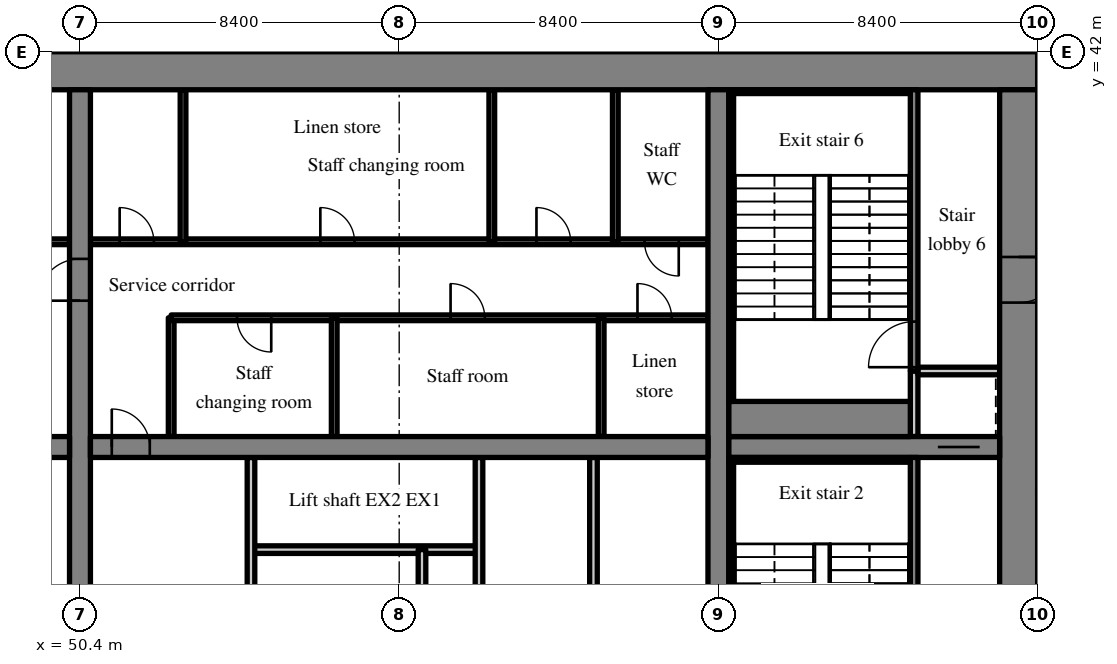
"""IFC4 building model, lengths in metres.
Left out: names, types, materials, properties, quantities, classifications, styles, units other than length and angle.
Written with IfcOpenShell. Run it as: python <this file> out.ifc"""

import sys

from ifc_helpers import new_model, si_unit, direction, frame, frame_2d, origin, place, context, subcontext, project, spatial, rectangle, extrude, source, transform, mapped, element, fill, save


model = new_model("IFC4")
c1 = context("Model", 3, precision=1e-05, world=origin(), true_north=direction((0.0, 1.0)))
c2 = subcontext(c1, "Body", "Model", "MODEL_VIEW")
j1 = project(units=[si_unit("LENGTHUNIT", "METRE"), si_unit("PLANEANGLEUNIT", "RADIAN")], contexts=[c1])
p1 = place(None, origin())
s1 = spatial("IfcSite", under=j1, at=p1, CompositionType="ELEMENT")
p2 = place(p1, origin())
s2 = spatial("IfcBuilding", under=s1, at=p2, CompositionType="ELEMENT")
p3 = place(p2, frame((0.0, 0.0, 58.2)))
s3 = spatial("IfcBuildingStorey", under=s2, at=p3, CompositionType="ELEMENT", Elevation=58.2)
m1 = source(origin(), c2, "Body", "SweptSolid", [
    extrude(rectangle(XDim=50.4, YDim=1.0, at=frame_2d((25.2, 0.0))), origin(), (0.0, 0.0, 1.0), 3.52),
])
p4 = place(p3, frame((25.2, 41.5, 0.0), z_axis=(0.0, 0.0, 1.0), x_axis=(1.0, 0.0, 0.0)))
e1 = element("IfcWall", 1, at=p4, inside=s3, PredefinedType="SHEAR", context=c2, shape_type="MappedRepresentation", body=[
    mapped(m1, transform((0.0, 0.0, 0.0), scale=1.0)),
])
m2 = source(origin(), c2, "Body", "SweptSolid", [
    extrude(rectangle(XDim=18.0, YDim=1.0, at=frame_2d((9.0, 0.0))), origin(), (0.0, 0.0, 1.0), 3.52),
])
p5 = place(p3, frame((75.1, 23.0, 0.0), z_axis=(0.0, 0.0, 1.0), x_axis=(0.0, 1.0, 0.0)))
e2 = element("IfcWall", 2, at=p5, inside=s3, PredefinedType="SHEAR", context=c2, shape_type="MappedRepresentation", body=[
    mapped(m2, transform((0.0, 0.0, 0.0), scale=1.0)),
])
m3 = source(origin(), c2, "Body", "SweptSolid", [
    extrude(rectangle(XDim=1.0, YDim=2.1, at=frame_2d((0.5, 1.05))), frame((0.0, 0.51, 0.0), z_axis=(0.0, -1.0, 0.0), x_axis=(1.0, 0.0, 0.0)), (0.0, 0.0, 1.0), 1.02),
])
p6 = place(p5, frame((2.5, 0.0, 0.0)))
e3 = element("IfcOpeningElement", 3, at=p6, cuts=e2, PredefinedType="OPENING", context=c2, shape_type="MappedRepresentation", body=[
    mapped(m3, transform((0.0, 0.0, 0.0), scale=1.0)),
])
m4 = source(origin(), c2, "Body", "SweptSolid", [
    extrude(rectangle(XDim=1.2, YDim=2.1, at=frame_2d((0.6, 1.05))), frame((0.0, 0.51, 0.0), z_axis=(0.0, -1.0, 0.0), x_axis=(1.0, 0.0, 0.0)), (0.0, 0.0, 1.0), 1.02),
])
p7 = place(p5, frame((12.4, 0.0, 0.0)))
e4 = element("IfcOpeningElement", 4, at=p7, cuts=e2, PredefinedType="OPENING", context=c2, shape_type="MappedRepresentation", body=[
    mapped(m4, transform((0.0, 0.0, 0.0), scale=1.0)),
])
m5 = source(origin(), c2, "Body", "SweptSolid", [
    extrude(rectangle(XDim=18.0, YDim=0.55, at=frame_2d((9.0, 0.0))), origin(), (0.0, 0.0, 1.0), 3.52),
])
p8 = place(p3, frame((50.4, 23.0, 0.0), z_axis=(0.0, 0.0, 1.0), x_axis=(0.0, 1.0, 0.0)))
e5 = element("IfcWall", 5, at=p8, inside=s3, PredefinedType="SHEAR", context=c2, shape_type="MappedRepresentation", body=[
    mapped(m5, transform((0.0, 0.0, 0.0), scale=1.0)),
])
m6 = source(origin(), c2, "Body", "SweptSolid", [
    extrude(rectangle(XDim=1.1, YDim=2.1, at=frame_2d((0.55, 1.05))), frame((0.0, 0.285, 0.0), z_axis=(0.0, -1.0, 0.0), x_axis=(1.0, 0.0, 0.0)), (0.0, 0.0, 1.0), 0.57),
])
p9 = place(p8, frame((12.45, 0.0, 0.0)))
e6 = element("IfcOpeningElement", 6, at=p9, cuts=e5, PredefinedType="OPENING", context=c2, shape_type="MappedRepresentation", body=[
    mapped(m6, transform((0.0, 0.0, 0.0), scale=1.0)),
])
p10 = place(p3, frame((67.2, 23.0, 0.0), z_axis=(0.0, 0.0, 1.0), x_axis=(0.0, 1.0, 0.0)))
e7 = element("IfcWall", 7, at=p10, inside=s3, PredefinedType="SHEAR", context=c2, shape_type="MappedRepresentation", body=[
    mapped(m5, transform((0.0, 0.0, 0.0), scale=1.0)),
])
m7 = source(origin(), c2, "Body", "SweptSolid", [
    extrude(rectangle(XDim=16.25, YDim=0.55, at=frame_2d((8.125, 0.0))), origin(), (0.0, 0.0, 1.0), 3.52),
])
p11 = place(p3, frame((33.875, 31.6, 0.0), z_axis=(0.0, 0.0, 1.0), x_axis=(1.0, 0.0, 0.0)))
e8 = element("IfcWall", 8, at=p11, inside=s3, PredefinedType="SHEAR", context=c2, shape_type="MappedRepresentation", body=[
    mapped(m7, transform((0.0, 0.0, 0.0), scale=1.0)),
])
m8 = source(origin(), c2, "Body", "SweptSolid", [
    extrude(rectangle(XDim=1.0, YDim=2.1, at=frame_2d((0.5, 1.05))), frame((0.0, 0.285, 0.0), z_axis=(0.0, -1.0, 0.0), x_axis=(1.0, 0.0, 0.0)), (0.0, 0.0, 1.0), 0.57),
])
p12 = place(p11, frame((14.687, 0.0, 0.0)))
e9 = element("IfcOpeningElement", 9, at=p12, cuts=e8, PredefinedType="OPENING", context=c2, shape_type="MappedRepresentation", body=[
    mapped(m8, transform((0.0, 0.0, 0.0), scale=1.0)),
])
p13 = place(p3, frame((50.675, 31.6, 0.0), z_axis=(0.0, 0.0, 1.0), x_axis=(1.0, 0.0, 0.0)))
e10 = element("IfcWall", 10, at=p13, inside=s3, PredefinedType="SHEAR", context=c2, shape_type="MappedRepresentation", body=[
    mapped(m7, transform((0.0, 0.0, 0.0), scale=1.0)),
])
p14 = place(p13, frame((0.562, 0.0, 0.0)))
e11 = element("IfcOpeningElement", 11, at=p14, cuts=e10, PredefinedType="OPENING", context=c2, shape_type="MappedRepresentation", body=[
    mapped(m8, transform((0.0, 0.0, 0.0), scale=1.0)),
])
m9 = source(origin(), c2, "Body", "SweptSolid", [
    extrude(rectangle(XDim=7.125, YDim=0.55, at=frame_2d((3.562, 0.0))), origin(), (0.0, 0.0, 1.0), 3.52),
])
p15 = place(p3, frame((67.475, 31.6, 0.0), z_axis=(0.0, 0.0, 1.0), x_axis=(1.0, 0.0, 0.0)))
e12 = element("IfcWall", 12, at=p15, inside=s3, PredefinedType="SHEAR", context=c2, shape_type="MappedRepresentation", body=[
    mapped(m9, transform((0.0, 0.0, 0.0), scale=1.0)),
])
p16 = place(p15, frame((5.5, 0.0, 0.0)))
e13 = element("IfcOpeningElement", 13, at=p16, cuts=e12, PredefinedType="OPENING", context=c2, shape_type="MappedRepresentation", body=[
    mapped(m6, transform((0.0, 0.0, 0.0), scale=1.0)),
])
m10 = source(origin(), c2, "Body", "SweptSolid", [
    extrude(rectangle(XDim=16.25, YDim=0.15, at=frame_2d((8.125, 0.0))), origin(), (0.0, 0.0, 1.0), 3.52),
])
p17 = place(p3, frame((33.875, 37.0, 0.0), z_axis=(0.0, 0.0, 1.0), x_axis=(1.0, 0.0, 0.0)))
e14 = element("IfcWall", 14, at=p17, inside=s3, PredefinedType="PARTITIONING", context=c2, shape_type="MappedRepresentation", body=[
    mapped(m10, transform((0.0, 0.0, 0.0), scale=1.0)),
])
m11 = source(origin(), c2, "Body", "SweptSolid", [
    extrude(rectangle(XDim=0.9, YDim=2.1, at=frame_2d((0.45, 1.05))), frame((0.0, 0.085, 0.0), z_axis=(0.0, -1.0, 0.0), x_axis=(1.0, 0.0, 0.0)), (0.0, 0.0, 1.0), 0.17),
])
p18 = place(p17, frame((3.206, 0.0, 0.0)))
e15 = element("IfcOpeningElement", 15, at=p18, cuts=e14, PredefinedType="OPENING", context=c2, shape_type="MappedRepresentation", body=[
    mapped(m11, transform((0.0, 0.0, 0.0), scale=1.0)),
])
p19 = place(p17, frame((8.081, 0.0, 0.0)))
e16 = element("IfcOpeningElement", 16, at=p19, cuts=e14, PredefinedType="OPENING", context=c2, shape_type="MappedRepresentation", body=[
    mapped(m11, transform((0.0, 0.0, 0.0), scale=1.0)),
])
p20 = place(p17, frame((11.331, 0.0, 0.0)))
e17 = element("IfcOpeningElement", 17, at=p20, cuts=e14, PredefinedType="OPENING", context=c2, shape_type="MappedRepresentation", body=[
    mapped(m11, transform((0.0, 0.0, 0.0), scale=1.0)),
])
p21 = place(p17, frame((14.581, 0.0, 0.0)))
e18 = element("IfcOpeningElement", 18, at=p21, cuts=e14, PredefinedType="OPENING", context=c2, shape_type="MappedRepresentation", body=[
    mapped(m11, transform((0.0, 0.0, 0.0), scale=1.0)),
])
m12 = source(origin(), c2, "Body", "SweptSolid", [
    extrude(rectangle(XDim=6.0, YDim=0.2, at=frame_2d((3.0, 0.0))), origin(), (0.0, 0.0, 1.0), 3.52),
])
p22 = place(p3, frame((60.9, 28.9, 0.0), z_axis=(0.0, 0.0, 1.0), x_axis=(-1.0, 0.0, 0.0)))
e19 = element("IfcWall", 19, at=p22, inside=s3, PredefinedType="SOLIDWALL", context=c2, shape_type="MappedRepresentation", body=[
    mapped(m12, transform((0.0, 0.0, 0.0), scale=1.0)),
])
m13 = source(origin(), c2, "Body", "SweptSolid", [
    extrude(rectangle(XDim=8.325, YDim=0.2, at=frame_2d((4.163, 0.0))), origin(), (0.0, 0.0, 1.0), 3.52),
])
for number, where, z_axis, x_axis in (
    (20, (54.9, 23.0, 0.0), (0.0, 0.0, 1.0), (0.0, 1.0, 0.0)),
    (21, (60.9, 23.0, 0.0), (0.0, 0.0, 1.0), (0.0, 1.0, 0.0)),
):
    element("IfcWall", number, at=place(p3, frame(where, z_axis=z_axis, x_axis=x_axis)), inside=s3, PredefinedType="PARTITIONING", context=c2, shape_type="MappedRepresentation", body=[
        mapped(m13, transform((0.0, 0.0, 0.0), scale=1.0)),
    ])
m14 = source(origin(), c2, "Body", "SweptSolid", [
    extrude(rectangle(XDim=5.9, YDim=0.2, at=frame_2d((2.95, 0.0))), origin(), (0.0, 0.0, 1.0), 3.52),
])
p23 = place(p3, frame((59.4, 23.0, 0.0), z_axis=(0.0, 0.0, 1.0), x_axis=(0.0, 1.0, 0.0)))
e22 = element("IfcWall", 22, at=p23, inside=s3, PredefinedType="PARTITIONING", context=c2, shape_type="MappedRepresentation", body=[
    mapped(m14, transform((0.0, 0.0, 0.0), scale=1.0)),
])
p24 = place(p3, frame((63.912, 23.0, 0.0), z_axis=(0.0, 0.0, 1.0), x_axis=(0.0, 1.0, 0.0)))
e23 = element("IfcWall", 23, at=p24, inside=s3, PredefinedType="PARTITIONING", context=c2, shape_type="MappedRepresentation", body=[
    mapped(m13, transform((0.0, 0.0, 0.0), scale=1.0)),
])
m15 = source(origin(), c2, "Body", "SweptSolid", [
    extrude(rectangle(XDim=3.125, YDim=0.15, at=frame_2d((1.562, 0.0))), origin(), (0.0, 0.0, 1.0), 3.52),
])
p25 = place(p3, frame((52.8, 31.875, 0.0), z_axis=(0.0, 0.0, 1.0), x_axis=(0.0, 1.0, 0.0)))
e24 = element("IfcWall", 24, at=p25, inside=s3, PredefinedType="PARTITIONING", context=c2, shape_type="MappedRepresentation", body=[
    mapped(m15, transform((0.0, 0.0, 0.0), scale=1.0)),
])
m16 = source(origin(), c2, "Body", "SweptSolid", [
    extrude(rectangle(XDim=14.125, YDim=0.15, at=frame_2d((7.062, 0.0))), origin(), (0.0, 0.0, 1.0), 3.52),
])
p26 = place(p3, frame((66.925, 35.0, 0.0), z_axis=(0.0, 0.0, 1.0), x_axis=(-1.0, 0.0, 0.0)))
e25 = element("IfcWall", 25, at=p26, inside=s3, PredefinedType="PARTITIONING", context=c2, shape_type="MappedRepresentation", body=[
    mapped(m16, transform((0.0, 0.0, 0.0), scale=1.0)),
])
p27 = place(p26, frame((0.955, 0.0, 0.0)))
e26 = element("IfcOpeningElement", 26, at=p27, cuts=e25, PredefinedType="OPENING", context=c2, shape_type="MappedRepresentation", body=[
    mapped(m11, transform((0.0, 0.0, 0.0), scale=1.0)),
])
p28 = place(p26, frame((5.873, 0.0, 0.0)))
e27 = element("IfcOpeningElement", 27, at=p28, cuts=e25, PredefinedType="OPENING", context=c2, shape_type="MappedRepresentation", body=[
    mapped(m11, transform((0.0, 0.0, 0.0), scale=1.0)),
])
p29 = place(p26, frame((11.492, 0.0, 0.0)))
e28 = element("IfcOpeningElement", 28, at=p29, cuts=e25, PredefinedType="OPENING", context=c2, shape_type="MappedRepresentation", body=[
    mapped(m11, transform((0.0, 0.0, 0.0), scale=1.0)),
])
p30 = place(p3, frame((66.925, 37.0, 0.0), z_axis=(0.0, 0.0, 1.0), x_axis=(-1.0, 0.0, 0.0)))
e29 = element("IfcWall", 29, at=p30, inside=s3, PredefinedType="PARTITIONING", context=c2, shape_type="MappedRepresentation", body=[
    mapped(m10, transform((0.0, 0.0, 0.0), scale=1.0)),
])
p31 = place(p30, frame((0.769, 0.0, 0.0)))
e30 = element("IfcOpeningElement", 30, at=p31, cuts=e29, PredefinedType="OPENING", context=c2, shape_type="MappedRepresentation", body=[
    mapped(m11, transform((0.0, 0.0, 0.0), scale=1.0)),
])
p32 = place(p30, frame((3.613, 0.0, 0.0)))
e31 = element("IfcOpeningElement", 31, at=p32, cuts=e29, PredefinedType="OPENING", context=c2, shape_type="MappedRepresentation", body=[
    mapped(m11, transform((0.0, 0.0, 0.0), scale=1.0)),
])
p33 = place(p30, frame((9.3, 0.0, 0.0)))
e32 = element("IfcOpeningElement", 32, at=p33, cuts=e29, PredefinedType="OPENING", context=c2, shape_type="MappedRepresentation", body=[
    mapped(m11, transform((0.0, 0.0, 0.0), scale=1.0)),
])
p34 = place(p30, frame((14.581, 0.0, 0.0)))
e33 = element("IfcOpeningElement", 33, at=p34, cuts=e29, PredefinedType="OPENING", context=c2, shape_type="MappedRepresentation", body=[
    mapped(m11, transform((0.0, 0.0, 0.0), scale=1.0)),
])
for number, where, z_axis, x_axis in (
    (34, (64.115, 31.875, 0.0), (0.0, 0.0, 1.0), (0.0, 1.0, 0.0)),
    (35, (57.09, 31.875, 0.0), (0.0, 0.0, 1.0), (0.0, 1.0, 0.0)),
):
    element("IfcWall", number, at=place(p3, frame(where, z_axis=z_axis, x_axis=x_axis)), inside=s3, PredefinedType="PARTITIONING", context=c2, shape_type="MappedRepresentation", body=[
        mapped(m15, transform((0.0, 0.0, 0.0), scale=1.0)),
    ])
m17 = source(origin(), c2, "Body", "SweptSolid", [
    extrude(rectangle(XDim=4.0, YDim=0.15, at=frame_2d((2.0, 0.0))), origin(), (0.0, 0.0, 1.0), 3.52),
])
for number, where, z_axis, x_axis in (
    (36, (64.487, 37.0, 0.0), (0.0, 0.0, 1.0), (0.0, 1.0, 0.0)),
    (37, (61.237, 37.0, 0.0), (0.0, 0.0, 1.0), (0.0, 1.0, 0.0)),
    (38, (53.112, 37.0, 0.0), (0.0, 0.0, 1.0), (0.0, 1.0, 0.0)),
):
    element("IfcWall", number, at=place(p3, frame(where, z_axis=z_axis, x_axis=x_axis)), inside=s3, PredefinedType="PARTITIONING", context=c2, shape_type="MappedRepresentation", body=[
        mapped(m17, transform((0.0, 0.0, 0.0), scale=1.0)),
    ])
m18 = source(origin(), c2, "Body", "SweptSolid", [
    extrude(rectangle(XDim=8.325, YDim=0.2, at=frame_2d((4.163, 0.0))), origin(), (0.0, 0.0, 1.0), 3.52),
])
p35 = place(p3, frame((72.35, 23.0, 0.0), z_axis=(0.0, 0.0, 1.0), x_axis=(0.0, 1.0, 0.0)))
e39 = element("IfcWall", 39, at=p35, inside=s3, PredefinedType="SOLIDWALL", context=c2, shape_type="MappedRepresentation", body=[
    mapped(m18, transform((0.0, 0.0, 0.0), scale=1.0)),
])
m19 = source(origin(), c2, "Body", "SweptSolid", [
    extrude(rectangle(XDim=1.2, YDim=2.1, at=frame_2d((0.6, 1.05))), frame((0.0, 0.11, 0.0), z_axis=(0.0, -1.0, 0.0), x_axis=(1.0, 0.0, 0.0)), (0.0, 0.0, 1.0), 0.22),
])
p36 = place(p35, frame((0.6, 0.0, 0.0)))
e40 = element("IfcOpeningElement", 40, at=p36, cuts=e39, PredefinedType="OPENING", context=c2, shape_type="MappedRepresentation", body=[
    mapped(m19, transform((0.0, 0.0, 0.0), scale=1.0)),
])
m20 = source(origin(), c2, "Body", "SweptSolid", [
    extrude(rectangle(XDim=1.725, YDim=0.2, at=frame_2d((0.863, 0.0))), origin(), (0.0, 0.0, 1.0), 3.52),
])
p37 = place(p3, frame((72.35, 31.875, 0.0), z_axis=(0.0, 0.0, 1.0), x_axis=(0.0, 1.0, 0.0)))
e41 = element("IfcWall", 41, at=p37, inside=s3, PredefinedType="SOLIDWALL", context=c2, shape_type="MappedRepresentation", body=[
    mapped(m20, transform((0.0, 0.0, 0.0), scale=1.0)),
])
m21 = source(origin(), c2, "Body", "SweptSolid", [
    extrude(rectangle(XDim=2.15, YDim=0.2, at=frame_2d((1.075, 0.0))), origin(), (0.0, 0.0, 1.0), 3.52),
])
p38 = place(p3, frame((72.45, 33.6, 0.0), z_axis=(0.0, 0.0, 1.0), x_axis=(1.0, 0.0, 0.0)))
e42 = element("IfcWall", 42, at=p38, inside=s3, PredefinedType="SOLIDWALL", context=c2, shape_type="MappedRepresentation", body=[
    mapped(m21, transform((0.0, 0.0, 0.0), scale=1.0)),
])
m22 = source(origin(), c2, "Body", "SweptSolid", [
    extrude(rectangle(XDim=7.4, YDim=0.2, at=frame_2d((3.7, 0.0))), origin(), (0.0, 0.0, 1.0), 3.52),
])
p39 = place(p3, frame((72.35, 33.6, 0.0), z_axis=(0.0, 0.0, 1.0), x_axis=(0.0, 1.0, 0.0)))
e43 = element("IfcWall", 43, at=p39, inside=s3, PredefinedType="SOLIDWALL", context=c2, shape_type="MappedRepresentation", body=[
    mapped(m22, transform((0.0, 0.0, 0.0), scale=1.0)),
])
p40 = place(p39, frame((0.1, 0.0, 0.0)))
e44 = element("IfcOpeningElement", 44, at=p40, cuts=e43, PredefinedType="OPENING", context=c2, shape_type="MappedRepresentation", body=[
    mapped(m19, transform((0.0, 0.0, 0.0), scale=1.0)),
])
m23 = source(origin(), c2, "Body", "SweptSolid", [
    extrude(rectangle(XDim=8.2, YDim=0.2, at=frame_2d((4.1, 0.0))), origin(), (0.0, 0.0, 1.0), 3.52),
])
p41 = place(p3, frame((83.8, 30.4, 0.0), z_axis=(0.0, 0.0, 1.0), x_axis=(-1.0, 0.0, 0.0)))
e45 = element("IfcWall", 45, at=p41, inside=s3, PredefinedType="SOLIDWALL", context=c2, shape_type="MappedRepresentation", body=[
    mapped(m23, transform((0.0, 0.0, 0.0), scale=1.0)),
])
m24 = source(origin(), c2, "Body", "SweptSolid", [
    extrude(rectangle(XDim=1.0, YDim=2.1, at=frame_2d((0.5, 1.05))), frame((0.0, 0.11, 0.0), z_axis=(0.0, -1.0, 0.0), x_axis=(1.0, 0.0, 0.0)), (0.0, 0.0, 1.0), 0.22),
])
p42 = place(p41, frame((6.1, 0.0, 0.0)))
e46 = element("IfcOpeningElement", 46, at=p42, cuts=e45, PredefinedType="OPENING", context=c2, shape_type="MappedRepresentation", body=[
    mapped(m24, transform((0.0, 0.0, 0.0), scale=1.0)),
])
m25 = source(origin(), c2, "Body", "SweptSolid", [
    extrude(rectangle(XDim=4.775, YDim=0.125, at=frame_2d((2.387, 0.0))), origin(), (0.0, 0.0, 1.0), 3.52),
])
p43 = place(p3, frame((67.475, 31.262, 0.0), z_axis=(0.0, 0.0, 1.0), x_axis=(1.0, 0.0, 0.0)))
e47 = element("IfcWall", 47, at=p43, inside=s3, PredefinedType="SOLIDWALL", context=c2, shape_type="MappedRepresentation", body=[
    mapped(m25, transform((0.0, 0.0, 0.0), scale=1.0)),
])
m26 = source(origin(), c2, "Body", "SweptSolid", [
    extrude(rectangle(XDim=8.1, YDim=0.125, at=frame_2d((4.05, 0.0))), origin(), (0.0, 0.0, 1.0), 3.52),
])
p44 = place(p3, frame((67.537, 23.1, 0.0), z_axis=(0.0, 0.0, 1.0), x_axis=(0.0, 1.0, 0.0)))
e48 = element("IfcWall", 48, at=p44, inside=s3, PredefinedType="SOLIDWALL", context=c2, shape_type="MappedRepresentation", body=[
    mapped(m26, transform((0.0, 0.0, 0.0), scale=1.0)),
])
m27 = source(origin(), c2, "Body", "SweptSolid", [
    extrude(rectangle(XDim=4.775, YDim=0.1, at=frame_2d((2.387, 0.0))), origin(), (0.0, 0.0, 1.0), 3.52),
])
p45 = place(p3, frame((67.475, 40.95, 0.0), z_axis=(0.0, 0.0, 1.0), x_axis=(1.0, 0.0, 0.0)))
e49 = element("IfcWall", 49, at=p45, inside=s3, PredefinedType="SOLIDWALL", context=c2, shape_type="MappedRepresentation", body=[
    mapped(m27, transform((0.0, 0.0, 0.0), scale=1.0)),
])
m28 = source(origin(), c2, "Body", "SweptSolid", [
    extrude(rectangle(XDim=4.775, YDim=0.925, at=frame_2d((2.387, 0.0))), origin(), (0.0, 0.0, 1.0), 3.52),
])
p46 = place(p3, frame((67.475, 32.337, 0.0), z_axis=(0.0, 0.0, 1.0), x_axis=(1.0, 0.0, 0.0)))
e50 = element("IfcWall", 50, at=p46, inside=s3, PredefinedType="SOLIDWALL", context=c2, shape_type="MappedRepresentation", body=[
    mapped(m28, transform((0.0, 0.0, 0.0), scale=1.0)),
])
p47 = place(p3, frame((67.537, 32.8, 0.0), z_axis=(0.0, 0.0, 1.0), x_axis=(0.0, 1.0, 0.0)))
e51 = element("IfcWall", 51, at=p47, inside=s3, PredefinedType="SOLIDWALL", context=c2, shape_type="MappedRepresentation", body=[
    mapped(m26, transform((0.0, 0.0, 0.0), scale=1.0)),
])
m29 = source(origin(), c2, "Body", "SweptSolid", [
    extrude(rectangle(XDim=1.0, YDim=2.1, at=frame_2d((0.5, 1.05))), frame((0.0, 0.025, 0.0), z_axis=(0.0, -1.0, 0.0), x_axis=(1.0, 0.0, 0.0)), (0.0, 0.0, 1.0), 0.05),
])
p48 = place(p14, origin())
e52 = element("IfcDoor", 52, at=p48, inside=s3, OperationType="SINGLE_SWING_LEFT", PredefinedType="DOOR", context=c2, shape_type="MappedRepresentation", body=[
    mapped(m29, transform((0.0, 0.0, 0.0), scale=1.0)),
])
fill(e11, e52)
m30 = source(origin(), c2, "Body", "SweptSolid", [
    extrude(rectangle(XDim=0.9, YDim=2.1, at=frame_2d((0.45, 1.05))), frame((0.0, 0.025, 0.0), z_axis=(0.0, -1.0, 0.0), x_axis=(1.0, 0.0, 0.0)), (0.0, 0.0, 1.0), 0.05),
])
p49 = place(p27, origin())
e53 = element("IfcDoor", 53, at=p49, inside=s3, OperationType="SINGLE_SWING_RIGHT", PredefinedType="DOOR", context=c2, shape_type="MappedRepresentation", body=[
    mapped(m30, transform((0.0, 0.0, 0.0), scale=1.0)),
])
fill(e26, e53)
p50 = place(p28, origin())
e54 = element("IfcDoor", 54, at=p50, inside=s3, OperationType="SINGLE_SWING_RIGHT", PredefinedType="DOOR", context=c2, shape_type="MappedRepresentation", body=[
    mapped(m30, transform((0.0, 0.0, 0.0), scale=1.0)),
])
fill(e27, e54)
p51 = place(p29, origin())
e55 = element("IfcDoor", 55, at=p51, inside=s3, OperationType="SINGLE_SWING_LEFT", PredefinedType="DOOR", context=c2, shape_type="MappedRepresentation", body=[
    mapped(m30, transform((0.0, 0.0, 0.0), scale=1.0)),
])
fill(e28, e55)
p52 = place(p31, origin())
e56 = element("IfcDoor", 56, at=p52, inside=s3, OperationType="SINGLE_SWING_LEFT", PredefinedType="DOOR", context=c2, shape_type="MappedRepresentation", body=[
    mapped(m30, transform((0.0, 0.0, 0.0), scale=1.0)),
])
fill(e30, e56)
p53 = place(p32, origin())
e57 = element("IfcDoor", 57, at=p53, inside=s3, OperationType="SINGLE_SWING_RIGHT", PredefinedType="DOOR", context=c2, shape_type="MappedRepresentation", body=[
    mapped(m30, transform((0.0, 0.0, 0.0), scale=1.0)),
])
fill(e31, e57)
p54 = place(p33, origin())
e58 = element("IfcDoor", 58, at=p54, inside=s3, OperationType="SINGLE_SWING_RIGHT", PredefinedType="DOOR", context=c2, shape_type="MappedRepresentation", body=[
    mapped(m30, transform((0.0, 0.0, 0.0), scale=1.0)),
])
fill(e32, e58)
p55 = place(p34, origin())
e59 = element("IfcDoor", 59, at=p55, inside=s3, OperationType="SINGLE_SWING_RIGHT", PredefinedType="DOOR", context=c2, shape_type="MappedRepresentation", body=[
    mapped(m30, transform((0.0, 0.0, 0.0), scale=1.0)),
])
fill(e33, e59)
m31 = source(origin(), c2, "Body", "SweptSolid", [
    extrude(rectangle(XDim=1.1, YDim=2.1, at=frame_2d((0.55, 1.05))), frame((0.0, 0.025, 0.0), z_axis=(0.0, -1.0, 0.0), x_axis=(1.0, 0.0, 0.0)), (0.0, 0.0, 1.0), 0.05),
])
p56 = place(p16, origin())
e60 = element("IfcDoor", 60, at=p56, inside=s3, OperationType="SLIDING_TO_RIGHT", PredefinedType="DOOR", context=c2, shape_type="MappedRepresentation", body=[
    mapped(m31, transform((0.0, 0.0, 0.0), scale=1.0)),
])
fill(e13, e60)
m32 = source(origin(), c2, "Body", "SweptSolid", [
    extrude(rectangle(XDim=1.2, YDim=2.1, at=frame_2d((0.6, 1.05))), frame((0.0, 0.025, 0.0), z_axis=(0.0, -1.0, 0.0), x_axis=(1.0, 0.0, 0.0)), (0.0, 0.0, 1.0), 0.05),
])
p57 = place(p40, origin())
e61 = element("IfcDoor", 61, at=p57, inside=s3, OperationType="SINGLE_SWING_LEFT", PredefinedType="DOOR", context=c2, shape_type="MappedRepresentation", body=[
    mapped(m32, transform((0.0, 0.0, 0.0), scale=1.0)),
])
fill(e44, e61)
p58 = place(p7, origin())
e62 = element("IfcDoor", 62, at=p58, inside=s3, OperationType="SINGLE_SWING_RIGHT", PredefinedType="DOOR", context=c2, shape_type="MappedRepresentation", body=[
    mapped(m32, transform((0.0, 0.0, 0.0), scale=1.0)),
])
fill(e4, e62)
p59 = place(p9, origin())
e63 = element("IfcDoor", 63, at=p59, inside=s3, OperationType="SINGLE_SWING_LEFT", PredefinedType="DOOR", context=c2, shape_type="MappedRepresentation", body=[
    mapped(m31, transform((0.0, 0.0, 0.0), scale=1.0)),
])
fill(e6, e63)
save(model, sys.argv[1])
